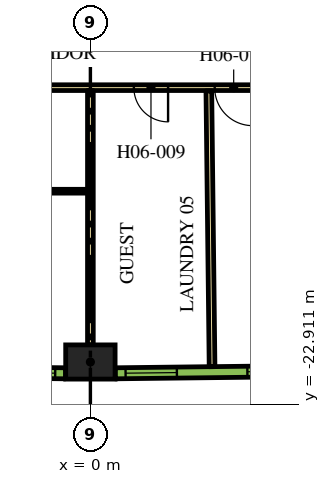
"""IFC4 building model, lengths in metres.
Left out: names, types, materials, properties, quantities, classifications, styles, units other than length and angle.
Written with IfcOpenShell. Run it as: python <this file> out.ifc"""

import sys

from ifc_helpers import new_model, si_unit, direction, frame, frame_2d, origin, origin_2d, place, context, subcontext, project, spatial, rectangle, extrude, element, fill, save


model = new_model("IFC4")
c1 = context("Model", 3, precision=1e-05, world=origin(), true_north=direction((0.0, 1.0)))
c2 = subcontext(c1, "Body", "Model", "MODEL_VIEW")
j1 = project(units=[si_unit("LENGTHUNIT", "METRE"), si_unit("PLANEANGLEUNIT", "RADIAN")], contexts=[c1])
p1 = place(None, origin())
s1 = spatial("IfcSite", under=j1, at=p1, CompositionType="ELEMENT")
p2 = place(p1, origin())
s2 = spatial("IfcBuilding", under=s1, at=p2, CompositionType="ELEMENT")
p3 = place(p2, frame((0.0, 0.0, 87.6)))
s3 = spatial("IfcBuildingStorey", under=s2, at=p3, CompositionType="ELEMENT", Elevation=87.6)
p4 = place(p3, frame((0.0, -21.794, 0.0), z_axis=(0.0, 0.0, 1.0), x_axis=(1.0, 0.0, 0.0)))
e1 = element("IfcColumn", 1, at=p4, inside=s3, PredefinedType="COLUMN", context=c2, shape_type="SweptSolid", body=[
    extrude(rectangle(XDim=1.3, YDim=0.9, at=origin_2d()), origin(), (0.0, 0.0, 1.0), 3.9),
])
p5 = place(p3, frame((12.918, -14.575, 0.0), z_axis=(0.0, 0.0, 1.0), x_axis=(-1.0, 0.0, 0.0)))
e2 = element("IfcWall", 2, at=p5, inside=s3, PredefinedType="PARTITIONING", context=c2, shape_type="SweptSolid", body=[
    extrude(rectangle(XDim=25.766, YDim=0.15, at=frame_2d((12.883, 0.0))), origin(), (0.0, 0.0, 1.0), 2.75),
])
p6 = place(p5, frame((19.306, 0.0, 0.0)))
e3 = element("IfcOpeningElement", 3, at=p6, cuts=e2, PredefinedType="OPENING", context=c2, shape_type="SweptSolid", body=[
    extrude(rectangle(XDim=1.0, YDim=2.1, at=frame_2d((0.5, 1.05))), frame((0.0, 0.085, 0.0), z_axis=(0.0, -1.0, 0.0), x_axis=(1.0, 0.0, 0.0)), (0.0, 0.0, 1.0), 0.17),
])
p7 = place(p5, frame((17.999, 0.0, 0.0)))
e4 = element("IfcOpeningElement", 4, at=p7, cuts=e2, PredefinedType="OPENING", context=c2, shape_type="SweptSolid", body=[
    extrude(rectangle(XDim=1.0, YDim=2.1, at=frame_2d((0.5, 1.05))), frame((0.0, 0.085, 0.0), z_axis=(0.0, -1.0, 0.0), x_axis=(1.0, 0.0, 0.0)), (0.0, 0.0, 1.0), 0.17),
])
p8 = place(p5, frame((10.874, 0.0, 0.0)))
e5 = element("IfcOpeningElement", 5, at=p8, cuts=e2, PredefinedType="OPENING", context=c2, shape_type="SweptSolid", body=[
    extrude(rectangle(XDim=0.9, YDim=2.1, at=frame_2d((0.45, 1.05))), frame((0.0, 0.085, 0.0), z_axis=(0.0, -1.0, 0.0), x_axis=(1.0, 0.0, 0.0)), (0.0, 0.0, 1.0), 0.17),
])
p9 = place(p5, frame((8.647, 0.0, 0.0)))
e6 = element("IfcOpeningElement", 6, at=p9, cuts=e2, PredefinedType="OPENING", context=c2, shape_type="SweptSolid", body=[
    extrude(rectangle(XDim=1.0, YDim=2.1, at=frame_2d((0.5, 1.05))), frame((0.0, 0.085, 0.0), z_axis=(0.0, -1.0, 0.0), x_axis=(1.0, 0.0, 0.0)), (0.0, 0.0, 1.0), 0.17),
])
p10 = place(p5, frame((0.18, 0.0, 0.0)))
e7 = element("IfcOpeningElement", 7, at=p10, cuts=e2, PredefinedType="OPENING", context=c2, shape_type="SweptSolid", body=[
    extrude(rectangle(XDim=1.0, YDim=2.1, at=frame_2d((0.5, 1.05))), frame((0.0, 0.085, 0.0), z_axis=(0.0, -1.0, 0.0), x_axis=(1.0, 0.0, 0.0)), (0.0, 0.0, 1.0), 0.17),
])
p11 = place(p3, frame((0.0, -21.344, 0.0), z_axis=(0.0, 0.0, 1.0), x_axis=(0.0, 1.0, 0.0)))
e8 = element("IfcWall", 8, at=p11, inside=s3, PredefinedType="PARTITIONING", context=c2, shape_type="SweptSolid", body=[
    extrude(rectangle(XDim=6.694, YDim=0.15, at=frame_2d((3.347, 0.0))), origin(), (0.0, 0.0, 1.0), 2.75),
])
p12 = place(p3, frame((3.202, -21.916, 0.0), z_axis=(0.0, 0.0, 1.0), x_axis=(-0.011707696285, 0.999931462575, 0.0)))
e9 = element("IfcWall", 9, at=p12, inside=s3, PredefinedType="PARTITIONING", context=c2, shape_type="SweptSolid", body=[
    extrude(rectangle(XDim=7.257, YDim=0.15, at=frame_2d((3.628, 0.0))), origin(), (0.0, 0.0, 1.0), 2.75),
])
p13 = place(p3, frame((-2.276, -17.3, 0.0), z_axis=(0.0, 0.0, 1.0), x_axis=(1.0, 0.0, 0.0)))
e10 = element("IfcWall", 10, at=p13, inside=s3, PredefinedType="PARTITIONING", context=c2, shape_type="SweptSolid", body=[
    extrude(rectangle(XDim=2.2, YDim=0.1, at=frame_2d((1.1, 0.0))), origin(), (0.0, 0.0, 1.0), 2.75),
])
p14 = place(p3, frame((-5.753, -22.031, 0.0), z_axis=(0.0, 0.0, 1.0), x_axis=(0.999931786565, -0.011679992145, 0.0)))
e11 = element("IfcWall", 11, at=p14, inside=s3, PredefinedType="SOLIDWALL", context=c2, shape_type="SweptSolid", body=[
    extrude(rectangle(XDim=5.1, YDim=0.29, at=frame_2d((2.55, 0.0))), origin(), (0.0, 0.0, 1.0), 3.65),
])
p15 = place(p14, frame((0.272, 0.0, 0.9)))
e12 = element("IfcOpeningElement", 12, at=p15, cuts=e11, PredefinedType="OPENING", context=c2, shape_type="SweptSolid", body=[
    extrude(rectangle(XDim=1.35, YDim=2.15, at=frame_2d((0.675, 1.075))), frame((0.0, 0.155, 0.0), z_axis=(0.0, -1.0, 0.0), x_axis=(1.0, 0.0, 0.0)), (0.0, 0.0, 1.0), 0.31),
])
p16 = place(p14, frame((3.478, 0.0, 0.9)))
e13 = element("IfcOpeningElement", 13, at=p16, cuts=e11, PredefinedType="OPENING", context=c2, shape_type="SweptSolid", body=[
    extrude(rectangle(XDim=1.35, YDim=2.15, at=frame_2d((0.675, 1.075))), frame((0.0, 0.155, 0.0), z_axis=(0.0, -1.0, 0.0), x_axis=(1.0, 0.0, 0.0)), (0.0, 0.0, 1.0), 0.31),
])
p17 = place(p3, frame((0.653, -22.091, 0.0), z_axis=(0.0, 0.0, 1.0), x_axis=(0.999931786565, 0.011679992145, 0.0)))
e14 = element("IfcWall", 14, at=p17, inside=s3, PredefinedType="SOLIDWALL", context=c2, shape_type="SweptSolid", body=[
    extrude(rectangle(XDim=5.1, YDim=0.29, at=frame_2d((2.55, 0.0))), origin(), (0.0, 0.0, 1.0), 3.65),
])
p18 = place(p17, frame((0.273, 0.0, 0.9)))
e15 = element("IfcOpeningElement", 15, at=p18, cuts=e14, PredefinedType="OPENING", context=c2, shape_type="SweptSolid", body=[
    extrude(rectangle(XDim=1.35, YDim=2.15, at=frame_2d((0.675, 1.075))), frame((0.0, 0.155, 0.0), z_axis=(0.0, -1.0, 0.0), x_axis=(1.0, 0.0, 0.0)), (0.0, 0.0, 1.0), 0.31),
])
p19 = place(p17, frame((3.478, 0.0, 0.9)))
e16 = element("IfcOpeningElement", 16, at=p19, cuts=e14, PredefinedType="OPENING", context=c2, shape_type="SweptSolid", body=[
    extrude(rectangle(XDim=1.35, YDim=2.15, at=frame_2d((0.675, 1.075))), frame((0.0, 0.155, 0.0), z_axis=(0.0, -1.0, 0.0), x_axis=(1.0, 0.0, 0.0)), (0.0, 0.0, 1.0), 0.31),
])
p20 = place(p8, origin())
e17 = element("IfcDoor", 17, at=p20, inside=s3, OperationType="SINGLE_SWING_LEFT", PredefinedType="DOOR", context=c2, shape_type="SweptSolid", body=[
    extrude(rectangle(XDim=0.9, YDim=2.1, at=frame_2d((0.45, 1.05))), frame((0.0, 0.025, 0.0), z_axis=(0.0, -1.0, 0.0), x_axis=(1.0, 0.0, 0.0)), (0.0, 0.0, 1.0), 0.05),
])
fill(e5, e17)
p21 = place(p9, origin())
e18 = element("IfcDoor", 18, at=p21, inside=s3, OperationType="SINGLE_SWING_RIGHT", PredefinedType="DOOR", context=c2, shape_type="SweptSolid", body=[
    extrude(rectangle(XDim=1.0, YDim=2.1, at=frame_2d((0.5, 1.05))), frame((0.0, 0.025, 0.0), z_axis=(0.0, -1.0, 0.0), x_axis=(1.0, 0.0, 0.0)), (0.0, 0.0, 1.0), 0.05),
])
fill(e6, e18)
p22 = place(p16, origin())
e19 = element("IfcWindow", 19, at=p22, inside=s3, PartitioningType="DOUBLE_PANEL_VERTICAL", PredefinedType="WINDOW", context=c2, shape_type="SweptSolid", body=[
    extrude(rectangle(XDim=1.35, YDim=2.15, at=frame_2d((0.675, 1.075))), frame((0.0, 0.015, 0.0), z_axis=(0.0, -1.0, 0.0), x_axis=(1.0, 0.0, 0.0)), (0.0, 0.0, 1.0), 0.06),
])
fill(e13, e19)
p23 = place(p18, origin())
e20 = element("IfcWindow", 20, at=p23, inside=s3, PartitioningType="DOUBLE_PANEL_VERTICAL", PredefinedType="WINDOW", context=c2, shape_type="SweptSolid", body=[
    extrude(rectangle(XDim=1.35, YDim=2.15, at=frame_2d((0.675, 1.075))), frame((0.0, 0.015, 0.0), z_axis=(0.0, -1.0, 0.0), x_axis=(1.0, 0.0, 0.0)), (0.0, 0.0, 1.0), 0.06),
])
fill(e15, e20)
p24 = place(p19, origin())
e21 = element("IfcWindow", 21, at=p24, inside=s3, PartitioningType="DOUBLE_PANEL_VERTICAL", PredefinedType="WINDOW", context=c2, shape_type="SweptSolid", body=[
    extrude(rectangle(XDim=1.35, YDim=2.15, at=frame_2d((0.675, 1.075))), frame((0.0, 0.015, 0.0), z_axis=(0.0, -1.0, 0.0), x_axis=(1.0, 0.0, 0.0)), (0.0, 0.0, 1.0), 0.06),
])
fill(e16, e21)
save(model, sys.argv[1])
